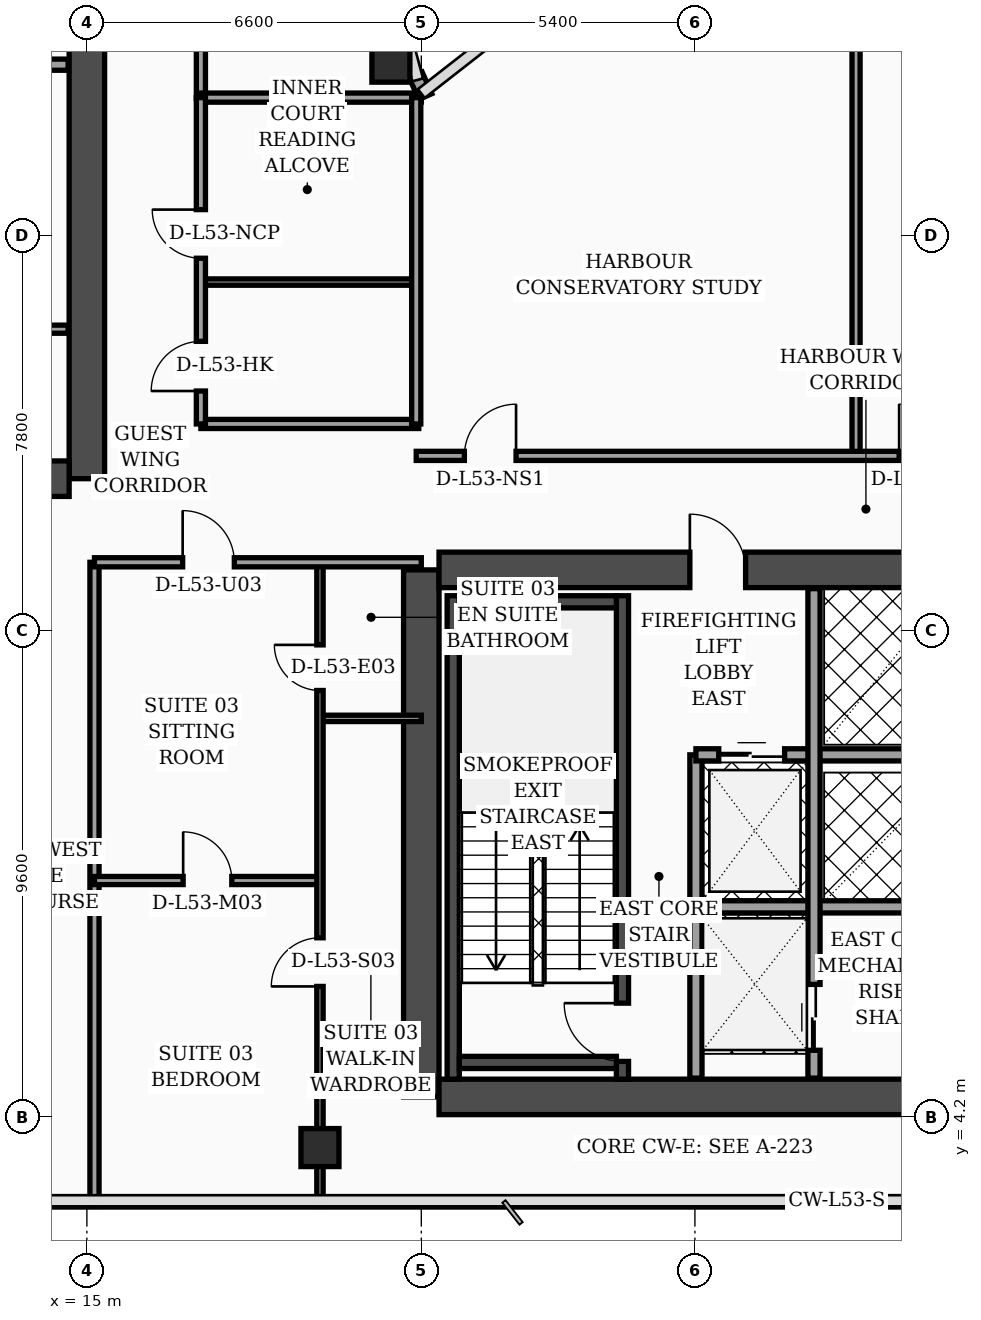
"""IFC4 building model, lengths in metres.
Left out: names, types, materials, properties, quantities, classifications, styles, units other than length and angle.
Written with IfcOpenShell. Run it as: python <this file> out.ifc"""

import sys

from ifc_helpers import new_model, si_unit, direction, frame, frame_2d, origin, origin_2d, place, context, subcontext, project, spatial, rectangle, hollow_rectangle, extrude, element, fill, save


model = new_model("IFC4")
c1 = context("Model", 3, precision=1e-05, world=origin(), true_north=direction((0.0, 1.0)))
c2 = subcontext(c1, "Body", "Model", "MODEL_VIEW")
j1 = project(units=[si_unit("LENGTHUNIT", "METRE"), si_unit("PLANEANGLEUNIT", "RADIAN")], contexts=[c1])
p1 = place(None, origin())
s1 = spatial("IfcSite", under=j1, at=p1, CompositionType="ELEMENT")
p2 = place(p1, origin())
s2 = spatial("IfcBuilding", under=s1, at=p2, CompositionType="ELEMENT")
p3 = place(p2, frame((0.0, 0.0, 214.8)))
s3 = spatial("IfcBuildingStorey", under=s2, at=p3, CompositionType="ELEMENT", Elevation=214.8)
p4 = place(p3, frame((15.0, 16.8, 0.0), z_axis=(0.0, 0.0, 1.0), x_axis=(0.0, 1.0, 0.0)))
e1 = element("IfcWall", 1, at=p4, inside=s3, PredefinedType="SHEAR", context=c2, shape_type="SweptSolid", body=[
    extrude(rectangle(XDim=21.6, YDim=0.7, at=frame_2d((10.8, 0.0))), origin(), (0.0, 0.0, 1.0), 4.05),
])
p5 = place(p4, frame((8.65, 0.0, 0.0)))
e2 = element("IfcOpeningElement", 2, at=p5, cuts=e1, PredefinedType="OPENING", context=c2, shape_type="SweptSolid", body=[
    extrude(rectangle(XDim=1.1, YDim=2.2, at=frame_2d((0.55, 1.1))), frame((0.0, 0.36, 0.0), z_axis=(0.0, -1.0, 0.0), x_axis=(1.0, 0.0, 0.0)), (0.0, 0.0, 1.0), 0.72),
])
p6 = place(p4, frame((10.85, 0.0, 0.0)))
e3 = element("IfcOpeningElement", 3, at=p6, cuts=e1, PredefinedType="OPENING", context=c2, shape_type="SweptSolid", body=[
    extrude(rectangle(XDim=1.1, YDim=2.2, at=frame_2d((0.55, 1.1))), frame((0.0, 0.36, 0.0), z_axis=(0.0, -1.0, 0.0), x_axis=(1.0, 0.0, 0.0)), (0.0, 0.0, 1.0), 0.72),
])
p7 = place(p4, frame((13.5, 0.0, 0.0)))
e4 = element("IfcOpeningElement", 4, at=p7, cuts=e1, PredefinedType="OPENING", context=c2, shape_type="SweptSolid", body=[
    extrude(rectangle(XDim=1.1, YDim=2.2, at=frame_2d((0.55, 1.1))), frame((0.0, 0.36, 0.0), z_axis=(0.0, -1.0, 0.0), x_axis=(1.0, 0.0, 0.0)), (0.0, 0.0, 1.0), 0.72),
])
p8 = place(p4, frame((16.15, 0.0, 0.0)))
e5 = element("IfcOpeningElement", 5, at=p8, cuts=e1, PredefinedType="OPENING", context=c2, shape_type="SweptSolid", body=[
    extrude(rectangle(XDim=1.1, YDim=2.2, at=frame_2d((0.55, 1.1))), frame((0.0, 0.36, 0.0), z_axis=(0.0, -1.0, 0.0), x_axis=(1.0, 0.0, 0.0)), (0.0, 0.0, 1.0), 0.72),
])
p9 = place(p3, frame((4.55, 16.8, 0.0), z_axis=(0.0, 0.0, 1.0), x_axis=(1.0, 0.0, 0.0)))
e6 = element("IfcWall", 6, at=p9, inside=s3, PredefinedType="SHEAR", context=c2, shape_type="SweptSolid", body=[
    extrude(rectangle(XDim=10.1, YDim=0.7, at=frame_2d((5.05, 0.0))), origin(), (0.0, 0.0, 1.0), 4.05),
])
p10 = place(p3, frame((21.6, 4.6, 0.0), z_axis=(0.0, 0.0, 1.0), x_axis=(0.0, 1.0, 0.0)))
e7 = element("IfcWall", 7, at=p10, inside=s3, PredefinedType="SHEAR", context=c2, shape_type="SweptSolid", body=[
    extrude(rectangle(XDim=10.4, YDim=0.7, at=frame_2d((5.2, 0.0))), origin(), (0.0, 0.0, 1.0), 4.05),
])
p11 = place(p3, frame((21.95, 15.0, 0.0), z_axis=(0.0, 0.0, 1.0), x_axis=(1.0, 0.0, 0.0)))
e8 = element("IfcWall", 8, at=p11, inside=s3, PredefinedType="SHEAR", context=c2, shape_type="SweptSolid", body=[
    extrude(rectangle(XDim=10.1, YDim=0.7, at=frame_2d((5.05, 0.0))), origin(), (0.0, 0.0, 1.0), 4.05),
])
p12 = place(p11, frame((4.95, 0.0, 0.0)))
e9 = element("IfcOpeningElement", 9, at=p12, cuts=e8, PredefinedType="OPENING", context=c2, shape_type="SweptSolid", body=[
    extrude(rectangle(XDim=1.1, YDim=2.2, at=frame_2d((0.55, 1.1))), frame((0.0, 0.36, 0.0), z_axis=(0.0, -1.0, 0.0), x_axis=(1.0, 0.0, 0.0)), (0.0, 0.0, 1.0), 0.72),
])
p13 = place(p3, frame((21.95, 4.6, 0.0), z_axis=(0.0, 0.0, 1.0), x_axis=(1.0, 0.0, 0.0)))
e10 = element("IfcWall", 10, at=p13, inside=s3, PredefinedType="SHEAR", context=c2, shape_type="SweptSolid", body=[
    extrude(rectangle(XDim=10.1, YDim=0.7, at=frame_2d((5.05, 0.0))), origin(), (0.0, 0.0, 1.0), 4.05),
])
p14 = place(p3, frame((22.23, 4.95, 0.0), z_axis=(0.0, 0.0, 1.0), x_axis=(0.0, 1.0, 0.0)))
e11 = element("IfcWall", 11, at=p14, inside=s3, PredefinedType="SOLIDWALL", context=c2, shape_type="SweptSolid", body=[
    extrude(rectangle(XDim=9.54, YDim=0.24, at=frame_2d((4.77, 0.0))), origin(), (0.0, 0.0, 1.0), 4.05),
])
p15 = place(p3, frame((25.57, 4.95, 0.0), z_axis=(0.0, 0.0, 1.0), x_axis=(0.0, 1.0, 0.0)))
e12 = element("IfcWall", 12, at=p15, inside=s3, PredefinedType="SOLIDWALL", context=c2, shape_type="SweptSolid", body=[
    extrude(rectangle(XDim=9.54, YDim=0.24, at=frame_2d((4.77, 0.0))), origin(), (0.0, 0.0, 1.0), 4.05),
])
p16 = place(p15, frame((0.35, 0.0, 0.0)))
e13 = element("IfcOpeningElement", 13, at=p16, cuts=e12, PredefinedType="OPENING", context=c2, shape_type="SweptSolid", body=[
    extrude(rectangle(XDim=1.15, YDim=2.2, at=frame_2d((0.575, 1.1))), frame((0.0, 0.13, 0.0), z_axis=(0.0, -1.0, 0.0), x_axis=(1.0, 0.0, 0.0)), (0.0, 0.0, 1.0), 0.26),
])
for number, where, z_axis, x_axis in (
    (14, (22.35, 5.28, 0.0), (0.0, 0.0, 1.0), (1.0, 0.0, 0.0)),
    (15, (22.35, 14.37, 0.0), (0.0, 0.0, 1.0), (1.0, 0.0, 0.0)),
):
    element("IfcWall", number, at=place(p3, frame(where, z_axis=z_axis, x_axis=x_axis)), inside=s3, PredefinedType="SOLIDWALL", context=c2, shape_type="SweptSolid", body=[
        extrude(rectangle(XDim=3.1, YDim=0.24, at=frame_2d((1.55, 0.0))), origin(), (0.0, 0.0, 1.0), 4.05),
    ])
for number, where, z_axis, x_axis in (
    (16, (21.0, 25.0, 0.0), (0.0, 0.0, 1.0), (1.0, 0.0, 0.0)),
    (17, (19.6, 3.6, 0.0), (0.0, 0.0, 1.0), (1.0, 0.0, 0.0)),
):
    element("IfcColumn", number, at=place(p3, frame(where, z_axis=z_axis, x_axis=x_axis)), inside=s3, PredefinedType="COLUMN", context=c2, shape_type="SweptSolid", body=[
        extrude(hollow_rectangle(XDim=0.75, YDim=0.75, WallThickness=0.032, at=origin_2d()), origin(), (0.0, 0.0, 1.0), 4.05),
    ])
p17 = place(p3, frame((21.68, 24.34, 0.0), z_axis=(0.0, 0.0, 1.0), x_axis=(-0.40758134973, 0.913168901875, 0.0)))
e18 = element("IfcWall", 18, at=p17, inside=s3, PredefinedType="SOLIDWALL", context=c2, shape_type="SweptSolid", body=[
    extrude(rectangle(XDim=0.471, YDim=0.28, at=frame_2d((0.235, 0.0))), origin(), (0.0, 0.0, 1.0), 4.05),
])
p18 = place(p3, frame((9.68, 19.75, 0.0), z_axis=(0.0, 0.0, 1.0), x_axis=(1.0, 0.0, 0.0)))
e19 = element("IfcWall", 19, at=p18, inside=s3, PredefinedType="PARTITIONING", context=c2, shape_type="SweptSolid", body=[
    extrude(rectangle(XDim=4.95, YDim=0.16, at=frame_2d((2.475, 0.0))), origin(), (0.0, 0.0, 1.0), 4.05),
])
p19 = place(p18, frame((1.1, 0.0, 0.0)))
e20 = element("IfcOpeningElement", 20, at=p19, cuts=e19, PredefinedType="OPENING", context=c2, shape_type="SweptSolid", body=[
    extrude(rectangle(XDim=0.98, YDim=2.15, at=frame_2d((0.49, 1.075))), frame((0.0, 0.09, 0.0), z_axis=(0.0, -1.0, 0.0), x_axis=(1.0, 0.0, 0.0)), (0.0, 0.0, 1.0), 0.18),
])
p20 = place(p3, frame((9.68, 24.97, 0.0), z_axis=(0.0, 0.0, 1.0), x_axis=(1.0, 0.0, 0.0)))
e21 = element("IfcWall", 21, at=p20, inside=s3, PredefinedType="SOLIDWALL", context=c2, shape_type="SweptSolid", body=[
    extrude(rectangle(XDim=4.95, YDim=0.22, at=frame_2d((2.475, 0.0))), origin(), (0.0, 0.0, 1.0), 3.45),
])
p21 = place(p20, frame((0.9, 0.0, 0.0)))
e22 = element("IfcOpeningElement", 22, at=p21, cuts=e21, PredefinedType="OPENING", context=c2, shape_type="SweptSolid", body=[
    extrude(rectangle(XDim=0.98, YDim=2.15, at=frame_2d((0.49, 1.075))), frame((0.0, 0.12, 0.0), z_axis=(0.0, -1.0, 0.0), x_axis=(1.0, 0.0, 0.0)), (0.0, 0.0, 1.0), 0.24),
])
p22 = place(p3, frame((27.02, 4.97, 0.0), z_axis=(0.0, 0.0, 1.0), x_axis=(0.0, 1.0, 0.0)))
e23 = element("IfcWall", 23, at=p22, inside=s3, PredefinedType="SOLIDWALL", context=c2, shape_type="SweptSolid", body=[
    extrude(rectangle(XDim=6.38, YDim=0.24, at=frame_2d((3.19, 0.0))), origin(), (0.0, 0.0, 1.0), 4.05),
])
p23 = place(p3, frame((27.02, 11.35, 0.0), z_axis=(0.0, 0.0, 1.0), x_axis=(1.0, 0.0, 0.0)))
e24 = element("IfcWall", 24, at=p23, inside=s3, PredefinedType="SOLIDWALL", context=c2, shape_type="SweptSolid", body=[
    extrude(rectangle(XDim=5.01, YDim=0.24, at=frame_2d((2.505, 0.0))), origin(), (0.0, 0.0, 1.0), 4.05),
])
p24 = place(p23, frame((0.45, 0.0, 0.0)))
e25 = element("IfcOpeningElement", 25, at=p24, cuts=e24, PredefinedType="OPENING", context=c2, shape_type="SweptSolid", body=[
    extrude(rectangle(XDim=1.3, YDim=2.35, at=frame_2d((0.65, 1.175))), frame((0.0, 0.13, 0.0), z_axis=(0.0, -1.0, 0.0), x_axis=(1.0, 0.0, 0.0)), (0.0, 0.0, 1.0), 0.26),
])
p25 = place(p3, frame((27.02, 8.35, 0.0), z_axis=(0.0, 0.0, 1.0), x_axis=(1.0, 0.0, 0.0)))
e26 = element("IfcWall", 26, at=p25, inside=s3, PredefinedType="SOLIDWALL", context=c2, shape_type="SweptSolid", body=[
    extrude(rectangle(XDim=5.01, YDim=0.24, at=frame_2d((2.505, 0.0))), origin(), (0.0, 0.0, 1.0), 4.05),
])
p26 = place(p3, frame((29.35, 4.97, 0.0), z_axis=(0.0, 0.0, 1.0), x_axis=(0.0, 1.0, 0.0)))
e27 = element("IfcWall", 27, at=p26, inside=s3, PredefinedType="SOLIDWALL", context=c2, shape_type="SweptSolid", body=[
    extrude(rectangle(XDim=9.66, YDim=0.24, at=frame_2d((4.83, 0.0))), origin(), (0.0, 0.0, 1.0), 4.05),
])
p27 = place(p26, frame((0.55, 0.0, 0.0)))
e28 = element("IfcOpeningElement", 28, at=p27, cuts=e27, PredefinedType="OPENING", context=c2, shape_type="SweptSolid", body=[
    extrude(rectangle(XDim=1.3, YDim=2.35, at=frame_2d((0.65, 1.175))), frame((0.0, 0.13, 0.0), z_axis=(0.0, -1.0, 0.0), x_axis=(1.0, 0.0, 0.0)), (0.0, 0.0, 1.0), 0.26),
])
p28 = place(p3, frame((15.15, 2.44, 0.0), z_axis=(0.0, 0.0, 1.0), x_axis=(0.0, 1.0, 0.0)))
e29 = element("IfcWall", 29, at=p28, inside=s3, PredefinedType="PARTITIONING", context=c2, shape_type="SweptSolid", body=[
    extrude(rectangle(XDim=12.71, YDim=0.18, at=frame_2d((6.355, 0.0))), origin(), (0.0, 0.0, 1.0), 2.35),
])
p29 = place(p3, frame((19.6, 12.07, 0.0), z_axis=(0.0, 0.0, 1.0), x_axis=(1.0, 0.0, 0.0)))
e30 = element("IfcWall", 30, at=p29, inside=s3, PredefinedType="PARTITIONING", context=c2, shape_type="SweptSolid", body=[
    extrude(rectangle(XDim=2.0, YDim=0.125, at=frame_2d((1.0, 0.0))), origin(), (0.0, 0.0, 1.0), 4.05),
])
p30 = place(p3, frame((15.15, 8.87, 0.0), z_axis=(0.0, 0.0, 1.0), x_axis=(1.0, 0.0, 0.0)))
e31 = element("IfcWall", 31, at=p30, inside=s3, PredefinedType="PARTITIONING", context=c2, shape_type="SweptSolid", body=[
    extrude(rectangle(XDim=4.45, YDim=0.16, at=frame_2d((2.225, 0.0))), origin(), (0.0, 0.0, 1.0), 4.05),
])
p31 = place(p30, frame((1.75, 0.0, 0.0)))
e32 = element("IfcOpeningElement", 32, at=p31, cuts=e31, PredefinedType="OPENING", context=c2, shape_type="SweptSolid", body=[
    extrude(rectangle(XDim=0.96, YDim=2.2, at=frame_2d((0.48, 1.1))), frame((0.0, 0.09, 0.0), z_axis=(0.0, -1.0, 0.0), x_axis=(1.0, 0.0, 0.0)), (0.0, 0.0, 1.0), 0.18),
])
p32 = place(p3, frame((19.6, 2.44, 0.0), z_axis=(0.0, 0.0, 1.0), x_axis=(0.0, 1.0, 0.0)))
e33 = element("IfcWall", 33, at=p32, inside=s3, PredefinedType="PARTITIONING", context=c2, shape_type="SweptSolid", body=[
    extrude(rectangle(XDim=12.71, YDim=0.125, at=frame_2d((6.355, 0.0))), origin(), (0.0, 0.0, 1.0), 2.35),
])
p33 = place(p32, frame((4.34, 0.0, 0.0)))
e34 = element("IfcOpeningElement", 34, at=p33, cuts=e33, PredefinedType="OPENING", context=c2, shape_type="SweptSolid", body=[
    extrude(rectangle(XDim=0.96, YDim=2.2, at=frame_2d((0.48, 1.1))), frame((0.0, 0.073, 0.0), z_axis=(0.0, -1.0, 0.0), x_axis=(1.0, 0.0, 0.0)), (0.0, 0.0, 1.0), 0.145),
])
p34 = place(p32, frame((10.18, 0.0, 0.0)))
e35 = element("IfcOpeningElement", 35, at=p34, cuts=e33, PredefinedType="OPENING", context=c2, shape_type="SweptSolid", body=[
    extrude(rectangle(XDim=0.9, YDim=2.15, at=frame_2d((0.45, 1.075))), frame((0.0, 0.073, 0.0), z_axis=(0.0, -1.0, 0.0), x_axis=(1.0, 0.0, 0.0)), (0.0, 0.0, 1.0), 0.145),
])
p35 = place(p3, frame((15.15, 15.15, 0.0), z_axis=(0.0, 0.0, 1.0), x_axis=(1.0, 0.0, 0.0)))
e36 = element("IfcWall", 36, at=p35, inside=s3, PredefinedType="PARTITIONING", context=c2, shape_type="SweptSolid", body=[
    extrude(rectangle(XDim=6.45, YDim=0.18, at=frame_2d((3.225, 0.0))), origin(), (0.0, 0.0, 1.0), 2.35),
])
p36 = place(p35, frame((1.74, 0.0, 0.0)))
e37 = element("IfcOpeningElement", 37, at=p36, cuts=e36, PredefinedType="OPENING", context=c2, shape_type="SweptSolid", body=[
    extrude(rectangle(XDim=1.02, YDim=2.2, at=frame_2d((0.51, 1.1))), frame((0.0, 0.1, 0.0), z_axis=(0.0, -1.0, 0.0), x_axis=(1.0, 0.0, 0.0)), (0.0, 0.0, 1.0), 0.2),
])
p37 = place(p3, frame((17.25, 24.3, 0.0), z_axis=(0.0, 0.0, 1.0), x_axis=(0.0, 1.0, 0.0)))
e38 = element("IfcWall", 38, at=p37, inside=s3, PredefinedType="PARTITIONING", context=c2, shape_type="SweptSolid", body=[
    extrude(rectangle(XDim=18.15, YDim=0.18, at=frame_2d((9.075, 0.0))), origin(), (0.0, 0.0, 1.0), 3.45),
])
p38 = place(p3, frame((17.25, 17.88, 0.0), z_axis=(0.0, 0.0, 1.0), x_axis=(1.0, 0.0, 0.0)))
e39 = element("IfcWall", 39, at=p38, inside=s3, PredefinedType="PARTITIONING", context=c2, shape_type="SweptSolid", body=[
    extrude(rectangle(XDim=4.3, YDim=0.18, at=frame_2d((2.15, 0.0))), origin(), (0.0, 0.0, 1.0), 4.05),
])
p39 = place(p3, frame((17.25, 20.68, 0.0), z_axis=(0.0, 0.0, 1.0), x_axis=(1.0, 0.0, 0.0)))
e40 = element("IfcWall", 40, at=p39, inside=s3, PredefinedType="PARTITIONING", context=c2, shape_type="SweptSolid", body=[
    extrude(rectangle(XDim=4.3, YDim=0.125, at=frame_2d((2.15, 0.0))), origin(), (0.0, 0.0, 1.0), 4.05),
])
p40 = place(p3, frame((17.25, 24.32, 0.0), z_axis=(0.0, 0.0, 1.0), x_axis=(1.0, 0.0, 0.0)))
e41 = element("IfcWall", 41, at=p40, inside=s3, PredefinedType="PARTITIONING", context=c2, shape_type="SweptSolid", body=[
    extrude(rectangle(XDim=4.35, YDim=0.18, at=frame_2d((2.175, 0.0))), origin(), (0.0, 0.0, 1.0), 4.05),
])
p41 = place(p3, frame((21.5, 17.88, 0.0), z_axis=(0.0, 0.0, 1.0), x_axis=(0.0, 1.0, 0.0)))
e42 = element("IfcWall", 42, at=p41, inside=s3, PredefinedType="PARTITIONING", context=c2, shape_type="SweptSolid", body=[
    extrude(rectangle(XDim=6.44, YDim=0.18, at=frame_2d((3.22, 0.0))), origin(), (0.0, 0.0, 1.0), 4.05),
])
p42 = place(p3, frame((17.25, 17.88, 0.0), z_axis=(0.0, 0.0, 1.0), x_axis=(0.0, 1.0, 0.0)))
e43 = element("IfcWall", 43, at=p42, inside=s3, PredefinedType="PARTITIONING", context=c2, shape_type="SweptSolid", body=[
    extrude(rectangle(XDim=6.44, YDim=0.18, at=frame_2d((3.22, 0.0))), origin(), (0.0, 0.0, 1.0), 4.05),
])
p43 = place(p42, frame((0.65, 0.0, 0.0)))
e44 = element("IfcOpeningElement", 44, at=p43, cuts=e43, PredefinedType="OPENING", context=c2, shape_type="SweptSolid", body=[
    extrude(rectangle(XDim=0.98, YDim=2.15, at=frame_2d((0.49, 1.075))), frame((0.0, 0.1, 0.0), z_axis=(0.0, -1.0, 0.0), x_axis=(1.0, 0.0, 0.0)), (0.0, 0.0, 1.0), 0.2),
])
p44 = place(p42, frame((3.27, 0.0, 0.0)))
e45 = element("IfcOpeningElement", 45, at=p44, cuts=e43, PredefinedType="OPENING", context=c2, shape_type="SweptSolid", body=[
    extrude(rectangle(XDim=0.96, YDim=2.2, at=frame_2d((0.48, 1.1))), frame((0.0, 0.1, 0.0), z_axis=(0.0, -1.0, 0.0), x_axis=(1.0, 0.0, 0.0)), (0.0, 0.0, 1.0), 0.2),
])
p45 = place(p3, frame((30.18, 17.25, 0.0), z_axis=(0.0, 0.0, 1.0), x_axis=(0.0, 1.0, 0.0)))
e46 = element("IfcWall", 46, at=p45, inside=s3, PredefinedType="PARTITIONING", context=c2, shape_type="SweptSolid", body=[
    extrude(rectangle(XDim=13.94, YDim=0.16, at=frame_2d((6.97, 0.0))), origin(), (0.0, 0.0, 1.0), 2.35),
])
p46 = place(p3, frame((21.5, 17.25, 0.0), z_axis=(0.0, 0.0, 1.0), x_axis=(1.0, 0.0, 0.0)))
e47 = element("IfcWall", 47, at=p46, inside=s3, PredefinedType="PARTITIONING", context=c2, shape_type="SweptSolid", body=[
    extrude(rectangle(XDim=17.25, YDim=0.18, at=frame_2d((8.625, 0.0))), origin(), (0.0, 0.0, 1.0), 2.35),
])
p47 = place(p46, frame((0.95, 0.0, 0.0)))
e48 = element("IfcOpeningElement", 48, at=p47, cuts=e47, PredefinedType="OPENING", context=c2, shape_type="SweptSolid", body=[
    extrude(rectangle(XDim=1.02, YDim=2.2, at=frame_2d((0.51, 1.1))), frame((0.0, 0.1, 0.0), z_axis=(0.0, -1.0, 0.0), x_axis=(1.0, 0.0, 0.0)), (0.0, 0.0, 1.0), 0.2),
])
p48 = place(p46, frame((9.53, 0.0, 0.0)))
e49 = element("IfcOpeningElement", 49, at=p48, cuts=e47, PredefinedType="OPENING", context=c2, shape_type="SweptSolid", body=[
    extrude(rectangle(XDim=1.02, YDim=2.2, at=frame_2d((0.51, 1.1))), frame((0.0, 0.1, 0.0), z_axis=(0.0, -1.0, 0.0), x_axis=(1.0, 0.0, 0.0)), (0.0, 0.0, 1.0), 0.2),
])
p49 = place(p24, origin())
e50 = element("IfcDoor", 50, at=p49, inside=s3, OperationType="DOUBLE_DOOR_SLIDING", PredefinedType="DOOR", context=c2, shape_type="SweptSolid", body=[
    extrude(rectangle(XDim=1.3, YDim=2.35, at=frame_2d((0.65, 1.175))), frame((0.0, 0.025, 0.0), z_axis=(0.0, -1.0, 0.0), x_axis=(1.0, 0.0, 0.0)), (0.0, 0.0, 1.0), 0.05),
])
fill(e25, e50)
p50 = place(p27, origin())
e51 = element("IfcDoor", 51, at=p50, inside=s3, OperationType="DOUBLE_DOOR_SLIDING", PredefinedType="DOOR", context=c2, shape_type="SweptSolid", body=[
    extrude(rectangle(XDim=1.3, YDim=2.35, at=frame_2d((0.65, 1.175))), frame((0.0, 0.025, 0.0), z_axis=(0.0, -1.0, 0.0), x_axis=(1.0, 0.0, 0.0)), (0.0, 0.0, 1.0), 0.05),
])
fill(e28, e51)
p51 = place(p31, origin())
e52 = element("IfcDoor", 52, at=p51, inside=s3, OperationType="SINGLE_SWING_LEFT", PredefinedType="DOOR", context=c2, shape_type="SweptSolid", body=[
    extrude(rectangle(XDim=0.96, YDim=2.2, at=frame_2d((0.48, 1.1))), frame((0.0, 0.025, 0.0), z_axis=(0.0, -1.0, 0.0), x_axis=(1.0, 0.0, 0.0)), (0.0, 0.0, 1.0), 0.05),
])
fill(e32, e52)
p52 = place(p33, origin())
e53 = element("IfcDoor", 53, at=p52, inside=s3, OperationType="SINGLE_SWING_LEFT", PredefinedType="DOOR", context=c2, shape_type="SweptSolid", body=[
    extrude(rectangle(XDim=0.96, YDim=2.2, at=frame_2d((0.48, 1.1))), frame((0.0, 0.025, 0.0), z_axis=(0.0, -1.0, 0.0), x_axis=(1.0, 0.0, 0.0)), (0.0, 0.0, 1.0), 0.05),
])
fill(e34, e53)
p53 = place(p34, origin())
e54 = element("IfcDoor", 54, at=p53, inside=s3, OperationType="SINGLE_SWING_RIGHT", PredefinedType="DOOR", context=c2, shape_type="SweptSolid", body=[
    extrude(rectangle(XDim=0.9, YDim=2.15, at=frame_2d((0.45, 1.075))), frame((0.0, 0.025, 0.0), z_axis=(0.0, -1.0, 0.0), x_axis=(1.0, 0.0, 0.0)), (0.0, 0.0, 1.0), 0.05),
])
fill(e35, e54)
p54 = place(p36, origin())
e55 = element("IfcDoor", 55, at=p54, inside=s3, OperationType="SINGLE_SWING_LEFT", PredefinedType="DOOR", context=c2, shape_type="SweptSolid", body=[
    extrude(rectangle(XDim=1.02, YDim=2.2, at=frame_2d((0.51, 1.1))), frame((0.0, 0.025, 0.0), z_axis=(0.0, -1.0, 0.0), x_axis=(1.0, 0.0, 0.0)), (0.0, 0.0, 1.0), 0.05),
])
fill(e37, e55)
p55 = place(p43, origin())
e56 = element("IfcDoor", 56, at=p55, inside=s3, OperationType="SINGLE_SWING_LEFT", PredefinedType="DOOR", context=c2, shape_type="SweptSolid", body=[
    extrude(rectangle(XDim=0.98, YDim=2.15, at=frame_2d((0.49, 1.075))), frame((0.0, 0.025, 0.0), z_axis=(0.0, -1.0, 0.0), x_axis=(1.0, 0.0, 0.0)), (0.0, 0.0, 1.0), 0.05),
])
fill(e44, e56)
p56 = place(p44, origin())
e57 = element("IfcDoor", 57, at=p56, inside=s3, OperationType="SINGLE_SWING_RIGHT", PredefinedType="DOOR", context=c2, shape_type="SweptSolid", body=[
    extrude(rectangle(XDim=0.96, YDim=2.2, at=frame_2d((0.48, 1.1))), frame((0.0, 0.025, 0.0), z_axis=(0.0, -1.0, 0.0), x_axis=(1.0, 0.0, 0.0)), (0.0, 0.0, 1.0), 0.05),
])
fill(e45, e57)
p57 = place(p47, origin())
e58 = element("IfcDoor", 58, at=p57, inside=s3, OperationType="SINGLE_SWING_RIGHT", PredefinedType="DOOR", context=c2, shape_type="SweptSolid", body=[
    extrude(rectangle(XDim=1.02, YDim=2.2, at=frame_2d((0.51, 1.1))), frame((0.0, 0.025, 0.0), z_axis=(0.0, -1.0, 0.0), x_axis=(1.0, 0.0, 0.0)), (0.0, 0.0, 1.0), 0.05),
])
fill(e48, e58)
p58 = place(p48, origin())
e59 = element("IfcDoor", 59, at=p58, inside=s3, OperationType="SINGLE_SWING_LEFT", PredefinedType="DOOR", context=c2, shape_type="SweptSolid", body=[
    extrude(rectangle(XDim=1.02, YDim=2.2, at=frame_2d((0.51, 1.1))), frame((0.0, 0.025, 0.0), z_axis=(0.0, -1.0, 0.0), x_axis=(1.0, 0.0, 0.0)), (0.0, 0.0, 1.0), 0.05),
])
fill(e49, e59)
p59 = place(p16, origin())
e60 = element("IfcDoor", 60, at=p59, inside=s3, OperationType="SINGLE_SWING_RIGHT", PredefinedType="DOOR", context=c2, shape_type="SweptSolid", body=[
    extrude(rectangle(XDim=1.15, YDim=2.2, at=frame_2d((0.575, 1.1))), frame((0.0, 0.025, 0.0), z_axis=(0.0, -1.0, 0.0), x_axis=(1.0, 0.0, 0.0)), (0.0, 0.0, 1.0), 0.05),
])
fill(e13, e60)
p60 = place(p12, origin())
e61 = element("IfcDoor", 61, at=p60, inside=s3, OperationType="SINGLE_SWING_LEFT", PredefinedType="DOOR", context=c2, shape_type="SweptSolid", body=[
    extrude(rectangle(XDim=1.1, YDim=2.2, at=frame_2d((0.55, 1.1))), frame((0.0, 0.025, 0.0), z_axis=(0.0, -1.0, 0.0), x_axis=(1.0, 0.0, 0.0)), (0.0, 0.0, 1.0), 0.05),
])
fill(e9, e61)
save(model, sys.argv[1])
